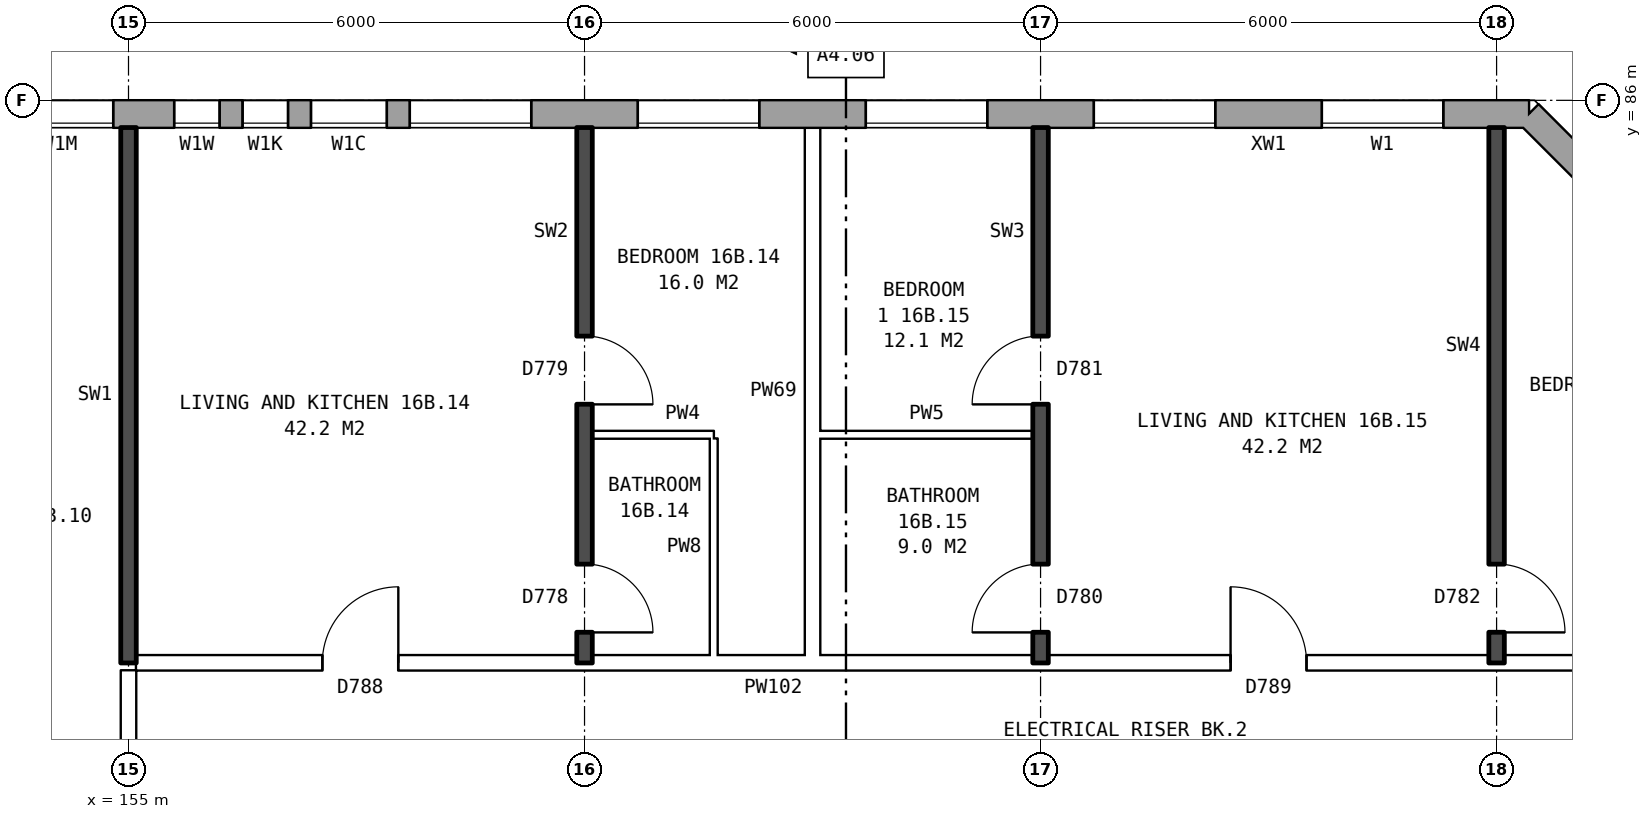
"""IFC4 building model, lengths in metres.
Left out: names, types, materials, properties, quantities, classifications, styles, units other than length and angle.
Written with IfcOpenShell. Run it as: python <this file> out.ifc"""

import sys

from ifc_helpers import new_model, si_unit, direction, frame, frame_2d, origin, place, context, subcontext, project, spatial, rectangle, extrude, element, fill, save


model = new_model("IFC4")
c1 = context("Model", 3, precision=1e-05, world=origin(), true_north=direction((0.0, 1.0)))
c2 = subcontext(c1, "Body", "Model", "MODEL_VIEW")
j1 = project(units=[si_unit("LENGTHUNIT", "METRE"), si_unit("PLANEANGLEUNIT", "RADIAN")], contexts=[c1])
p1 = place(None, origin())
s1 = spatial("IfcSite", under=j1, at=p1, CompositionType="ELEMENT")
p2 = place(p1, origin())
s2 = spatial("IfcBuilding", under=s1, at=p2, CompositionType="ELEMENT")
p3 = place(p2, frame((0.0, 0.0, 59.8)))
s3 = spatial("IfcBuildingStorey", under=s2, at=p3, CompositionType="ELEMENT", Elevation=59.8)
p4 = place(p3, frame((176.32, 82.925, 0.0), z_axis=(0.0, 0.0, 1.0), x_axis=(-0.707106781187, 0.707106781187, 0.0)))
e1 = element("IfcWall", 1, at=p4, inside=s3, PredefinedType="STANDARD", context=c2, shape_type="SweptSolid", body=[
    extrude(rectangle(XDim=4.094, YDim=0.36, at=frame_2d((2.047, 0.0))), origin(), (0.0, 0.0, 1.0), 2.85),
])
p5 = place(p4, frame((1.247, 0.0, 0.8)))
e2 = element("IfcOpeningElement", 2, at=p5, cuts=e1, PredefinedType="OPENING", context=c2, shape_type="SweptSolid", body=[
    extrude(rectangle(XDim=1.6, YDim=1.8, at=frame_2d((0.8, 0.9))), frame((0.0, 0.19, 0.0), z_axis=(0.0, -1.0, 0.0), x_axis=(1.0, 0.0, 0.0)), (0.0, 0.0, 1.0), 0.38),
])
p6 = place(p3, frame((173.425, 85.82, 0.0), z_axis=(0.0, 0.0, 1.0), x_axis=(-1.0, 0.0, 0.0)))
e3 = element("IfcWall", 3, at=p6, inside=s3, PredefinedType="STANDARD", context=c2, shape_type="SweptSolid", body=[
    extrude(rectangle(XDim=39.351, YDim=0.36, at=frame_2d((19.675, 0.0))), origin(), (0.0, 0.0, 1.0), 2.85),
])
p7 = place(p6, frame((1.125, 0.0, 0.8)))
e4 = element("IfcOpeningElement", 4, at=p7, cuts=e3, PredefinedType="OPENING", context=c2, shape_type="SweptSolid", body=[
    extrude(rectangle(XDim=1.6, YDim=1.8, at=frame_2d((0.8, 0.9))), frame((0.0, 0.19, 0.0), z_axis=(0.0, -1.0, 0.0), x_axis=(1.0, 0.0, 0.0)), (0.0, 0.0, 1.0), 0.38),
])
p8 = place(p6, frame((4.125, 0.0, 0.8)))
e5 = element("IfcOpeningElement", 5, at=p8, cuts=e3, PredefinedType="OPENING", context=c2, shape_type="SweptSolid", body=[
    extrude(rectangle(XDim=1.6, YDim=1.8, at=frame_2d((0.8, 0.9))), frame((0.0, 0.19, 0.0), z_axis=(0.0, -1.0, 0.0), x_axis=(1.0, 0.0, 0.0)), (0.0, 0.0, 1.0), 0.38),
])
p9 = place(p6, frame((7.125, 0.0, 0.8)))
e6 = element("IfcOpeningElement", 6, at=p9, cuts=e3, PredefinedType="OPENING", context=c2, shape_type="SweptSolid", body=[
    extrude(rectangle(XDim=1.6, YDim=1.8, at=frame_2d((0.8, 0.9))), frame((0.0, 0.19, 0.0), z_axis=(0.0, -1.0, 0.0), x_axis=(1.0, 0.0, 0.0)), (0.0, 0.0, 1.0), 0.38),
])
p10 = place(p6, frame((10.125, 0.0, 0.8)))
e7 = element("IfcOpeningElement", 7, at=p10, cuts=e3, PredefinedType="OPENING", context=c2, shape_type="SweptSolid", body=[
    extrude(rectangle(XDim=1.6, YDim=1.8, at=frame_2d((0.8, 0.9))), frame((0.0, 0.19, 0.0), z_axis=(0.0, -1.0, 0.0), x_axis=(1.0, 0.0, 0.0)), (0.0, 0.0, 1.0), 0.38),
])
p11 = place(p6, frame((13.125, 0.0, 0.8)))
e8 = element("IfcOpeningElement", 8, at=p11, cuts=e3, PredefinedType="OPENING", context=c2, shape_type="SweptSolid", body=[
    extrude(rectangle(XDim=1.6, YDim=1.8, at=frame_2d((0.8, 0.9))), frame((0.0, 0.19, 0.0), z_axis=(0.0, -1.0, 0.0), x_axis=(1.0, 0.0, 0.0)), (0.0, 0.0, 1.0), 0.38),
])
p12 = place(p6, frame((15.025, 0.0, 0.8)))
e9 = element("IfcOpeningElement", 9, at=p12, cuts=e3, PredefinedType="OPENING", context=c2, shape_type="SweptSolid", body=[
    extrude(rectangle(XDim=1.0, YDim=1.8, at=frame_2d((0.5, 0.9))), frame((0.0, 0.19, 0.0), z_axis=(0.0, -1.0, 0.0), x_axis=(1.0, 0.0, 0.0)), (0.0, 0.0, 1.0), 0.38),
])
p13 = place(p6, frame((18.625, 0.0, 0.15)))
e10 = element("IfcOpeningElement", 10, at=p13, cuts=e3, PredefinedType="OPENING", context=c2, shape_type="SweptSolid", body=[
    extrude(rectangle(XDim=1.4, YDim=1.2, at=frame_2d((0.7, 0.6))), frame((0.0, 0.19, 0.0), z_axis=(0.0, -1.0, 0.0), x_axis=(1.0, 0.0, 0.0)), (0.0, 0.0, 1.0), 0.38),
])
p14 = place(p6, frame((21.575, 0.0, 1.7)))
e11 = element("IfcOpeningElement", 11, at=p14, cuts=e3, PredefinedType="OPENING", context=c2, shape_type="SweptSolid", body=[
    extrude(rectangle(XDim=0.6, YDim=0.9, at=frame_2d((0.3, 0.45))), frame((0.0, 0.19, 0.0), z_axis=(0.0, -1.0, 0.0), x_axis=(1.0, 0.0, 0.0)), (0.0, 0.0, 1.0), 0.38),
])
p15 = place(p6, frame((25.125, 0.0, 0.8)))
e12 = element("IfcOpeningElement", 12, at=p15, cuts=e3, PredefinedType="OPENING", context=c2, shape_type="SweptSolid", body=[
    extrude(rectangle(XDim=1.6, YDim=1.8, at=frame_2d((0.8, 0.9))), frame((0.0, 0.19, 0.0), z_axis=(0.0, -1.0, 0.0), x_axis=(1.0, 0.0, 0.0)), (0.0, 0.0, 1.0), 0.38),
])
p16 = place(p6, frame((28.125, 0.0, 0.8)))
e13 = element("IfcOpeningElement", 13, at=p16, cuts=e3, PredefinedType="OPENING", context=c2, shape_type="SweptSolid", body=[
    extrude(rectangle(XDim=1.6, YDim=1.8, at=frame_2d((0.8, 0.9))), frame((0.0, 0.19, 0.0), z_axis=(0.0, -1.0, 0.0), x_axis=(1.0, 0.0, 0.0)), (0.0, 0.0, 1.0), 0.38),
])
p17 = place(p6, frame((31.125, 0.0, 0.8)))
e14 = element("IfcOpeningElement", 14, at=p17, cuts=e3, PredefinedType="OPENING", context=c2, shape_type="SweptSolid", body=[
    extrude(rectangle(XDim=1.6, YDim=1.8, at=frame_2d((0.8, 0.9))), frame((0.0, 0.19, 0.0), z_axis=(0.0, -1.0, 0.0), x_axis=(1.0, 0.0, 0.0)), (0.0, 0.0, 1.0), 0.38),
])
p18 = place(p6, frame((34.125, 0.0, 0.8)))
e15 = element("IfcOpeningElement", 15, at=p18, cuts=e3, PredefinedType="OPENING", context=c2, shape_type="SweptSolid", body=[
    extrude(rectangle(XDim=1.6, YDim=1.8, at=frame_2d((0.8, 0.9))), frame((0.0, 0.19, 0.0), z_axis=(0.0, -1.0, 0.0), x_axis=(1.0, 0.0, 0.0)), (0.0, 0.0, 1.0), 0.38),
])
p19 = place(p6, frame((37.125, 0.0, 0.8)))
e16 = element("IfcOpeningElement", 16, at=p19, cuts=e3, PredefinedType="OPENING", context=c2, shape_type="SweptSolid", body=[
    extrude(rectangle(XDim=1.6, YDim=1.8, at=frame_2d((0.8, 0.9))), frame((0.0, 0.19, 0.0), z_axis=(0.0, -1.0, 0.0), x_axis=(1.0, 0.0, 0.0)), (0.0, 0.0, 1.0), 0.38),
])
p20 = place(p6, frame((16.325, 0.0, 1.0)))
e17 = element("IfcOpeningElement", 17, at=p20, cuts=e3, PredefinedType="OPENING", context=c2, shape_type="SweptSolid", body=[
    extrude(rectangle(XDim=0.6, YDim=1.5, at=frame_2d((0.3, 0.75))), frame((0.0, 0.19, 0.0), z_axis=(0.0, -1.0, 0.0), x_axis=(1.0, 0.0, 0.0)), (0.0, 0.0, 1.0), 0.38),
])
p21 = place(p6, frame((17.225, 0.0, 1.7)))
e18 = element("IfcOpeningElement", 18, at=p21, cuts=e3, PredefinedType="OPENING", context=c2, shape_type="SweptSolid", body=[
    extrude(rectangle(XDim=0.6, YDim=0.9, at=frame_2d((0.3, 0.45))), frame((0.0, 0.19, 0.0), z_axis=(0.0, -1.0, 0.0), x_axis=(1.0, 0.0, 0.0)), (0.0, 0.0, 1.0), 0.38),
])
p22 = place(p6, frame((20.325, 0.0, 0.25)))
e19 = element("IfcOpeningElement", 19, at=p22, cuts=e3, PredefinedType="OPENING", context=c2, shape_type="SweptSolid", body=[
    extrude(rectangle(XDim=0.6, YDim=0.9, at=frame_2d((0.3, 0.45))), frame((0.0, 0.19, 0.0), z_axis=(0.0, -1.0, 0.0), x_axis=(1.0, 0.0, 0.0)), (0.0, 0.0, 1.0), 0.38),
])
p23 = place(p6, frame((22.625, 0.0, 0.8)))
e20 = element("IfcOpeningElement", 20, at=p23, cuts=e3, PredefinedType="OPENING", context=c2, shape_type="SweptSolid", body=[
    extrude(rectangle(XDim=1.6, YDim=1.8, at=frame_2d((0.8, 0.9))), frame((0.0, 0.19, 0.0), z_axis=(0.0, -1.0, 0.0), x_axis=(1.0, 0.0, 0.0)), (0.0, 0.0, 1.0), 0.38),
])
p24 = place(p3, frame((155.1, 78.6, 0.0), z_axis=(0.0, 0.0, 1.0), x_axis=(1.0, 0.0, 0.0)))
e21 = element("IfcWall", 21, at=p24, inside=s3, PredefinedType="PARTITIONING", context=c2, shape_type="SweptSolid", body=[
    extrude(rectangle(XDim=21.04, YDim=0.2, at=frame_2d((10.52, 0.0))), origin(), (0.0, 0.0, 1.0), 2.85),
])
p25 = place(p24, frame((2.45, 0.0, 0.0)))
e22 = element("IfcOpeningElement", 22, at=p25, cuts=e21, PredefinedType="OPENING", context=c2, shape_type="SweptSolid", body=[
    extrude(rectangle(XDim=1.0, YDim=2.1, at=frame_2d((0.5, 1.05))), frame((0.0, 0.11, 0.0), z_axis=(0.0, -1.0, 0.0), x_axis=(1.0, 0.0, 0.0)), (0.0, 0.0, 1.0), 0.22),
])
p26 = place(p24, frame((14.4, 0.0, 0.0)))
e23 = element("IfcOpeningElement", 23, at=p26, cuts=e21, PredefinedType="OPENING", context=c2, shape_type="SweptSolid", body=[
    extrude(rectangle(XDim=1.0, YDim=2.1, at=frame_2d((0.5, 1.05))), frame((0.0, 0.11, 0.0), z_axis=(0.0, -1.0, 0.0), x_axis=(1.0, 0.0, 0.0)), (0.0, 0.0, 1.0), 0.22),
])
p27 = place(p3, frame((161.1, 81.6, 0.0), z_axis=(0.0, 0.0, 1.0), x_axis=(1.0, 0.0, 0.0)))
e24 = element("IfcWall", 24, at=p27, inside=s3, PredefinedType="PARTITIONING", context=c2, shape_type="SweptSolid", body=[
    extrude(rectangle(XDim=1.6, YDim=0.1, at=frame_2d((0.8, 0.0))), origin(), (0.0, 0.0, 1.0), 2.85),
])
p28 = place(p3, frame((164.1, 81.6, 0.0), z_axis=(0.0, 0.0, 1.0), x_axis=(1.0, 0.0, 0.0)))
e25 = element("IfcWall", 25, at=p28, inside=s3, PredefinedType="PARTITIONING", context=c2, shape_type="SweptSolid", body=[
    extrude(rectangle(XDim=2.8, YDim=0.1, at=frame_2d((1.4, 0.0))), origin(), (0.0, 0.0, 1.0), 2.85),
])
p29 = place(p3, frame((155.0, 76.3, 0.0), z_axis=(0.0, 0.0, 1.0), x_axis=(0.0, 1.0, 0.0)))
e26 = element("IfcWall", 26, at=p29, inside=s3, PredefinedType="PARTITIONING", context=c2, shape_type="SweptSolid", body=[
    extrude(rectangle(XDim=2.2, YDim=0.2, at=frame_2d((1.1, 0.0))), origin(), (0.0, 0.0, 1.0), 2.85),
])
p30 = place(p3, frame((155.0, 78.6, 0.0), z_axis=(0.0, 0.0, 1.0), x_axis=(0.0, 1.0, 0.0)))
e27 = element("IfcWall", 27, at=p30, inside=s3, PredefinedType="SOLIDWALL", context=c2, shape_type="SweptSolid", body=[
    extrude(rectangle(XDim=7.04, YDim=0.2, at=frame_2d((3.52, 0.0))), origin(), (0.0, 0.0, 1.0), 2.85),
])
p31 = place(p3, frame((161.0, 78.6, 0.0), z_axis=(0.0, 0.0, 1.0), x_axis=(0.0, 1.0, 0.0)))
e28 = element("IfcWall", 28, at=p31, inside=s3, PredefinedType="SOLIDWALL", context=c2, shape_type="SweptSolid", body=[
    extrude(rectangle(XDim=7.04, YDim=0.2, at=frame_2d((3.52, 0.0))), origin(), (0.0, 0.0, 1.0), 2.85),
])
p32 = place(p31, frame((3.4, 0.0, 0.0)))
e29 = element("IfcOpeningElement", 29, at=p32, cuts=e28, PredefinedType="OPENING", context=c2, shape_type="SweptSolid", body=[
    extrude(rectangle(XDim=0.9, YDim=2.1, at=frame_2d((0.45, 1.05))), frame((0.0, 0.11, 0.0), z_axis=(0.0, -1.0, 0.0), x_axis=(1.0, 0.0, 0.0)), (0.0, 0.0, 1.0), 0.22),
])
p33 = place(p31, frame((0.4, 0.0, 0.0)))
e30 = element("IfcOpeningElement", 30, at=p33, cuts=e28, PredefinedType="OPENING", context=c2, shape_type="SweptSolid", body=[
    extrude(rectangle(XDim=0.9, YDim=2.1, at=frame_2d((0.45, 1.05))), frame((0.0, 0.11, 0.0), z_axis=(0.0, -1.0, 0.0), x_axis=(1.0, 0.0, 0.0)), (0.0, 0.0, 1.0), 0.22),
])
p34 = place(p3, frame((162.7, 78.7, 0.0), z_axis=(0.0, 0.0, 1.0), x_axis=(0.0, 1.0, 0.0)))
e31 = element("IfcWall", 31, at=p34, inside=s3, PredefinedType="PARTITIONING", context=c2, shape_type="SweptSolid", body=[
    extrude(rectangle(XDim=2.85, YDim=0.1, at=frame_2d((1.425, 0.0))), origin(), (0.0, 0.0, 1.0), 2.85),
])
p35 = place(p3, frame((164.0, 78.7, 0.0), z_axis=(0.0, 0.0, 1.0), x_axis=(0.0, 1.0, 0.0)))
e32 = element("IfcWall", 32, at=p35, inside=s3, PredefinedType="PARTITIONING", context=c2, shape_type="SweptSolid", body=[
    extrude(rectangle(XDim=6.94, YDim=0.2, at=frame_2d((3.47, 0.0))), origin(), (0.0, 0.0, 1.0), 2.85),
])
p36 = place(p3, frame((167.0, 78.6, 0.0), z_axis=(0.0, 0.0, 1.0), x_axis=(0.0, 1.0, 0.0)))
e33 = element("IfcWall", 33, at=p36, inside=s3, PredefinedType="SOLIDWALL", context=c2, shape_type="SweptSolid", body=[
    extrude(rectangle(XDim=7.04, YDim=0.2, at=frame_2d((3.52, 0.0))), origin(), (0.0, 0.0, 1.0), 2.85),
])
p37 = place(p36, frame((3.4, 0.0, 0.0)))
e34 = element("IfcOpeningElement", 34, at=p37, cuts=e33, PredefinedType="OPENING", context=c2, shape_type="SweptSolid", body=[
    extrude(rectangle(XDim=0.9, YDim=2.1, at=frame_2d((0.45, 1.05))), frame((0.0, 0.11, 0.0), z_axis=(0.0, -1.0, 0.0), x_axis=(1.0, 0.0, 0.0)), (0.0, 0.0, 1.0), 0.22),
])
p38 = place(p36, frame((0.4, 0.0, 0.0)))
e35 = element("IfcOpeningElement", 35, at=p38, cuts=e33, PredefinedType="OPENING", context=c2, shape_type="SweptSolid", body=[
    extrude(rectangle(XDim=0.9, YDim=2.1, at=frame_2d((0.45, 1.05))), frame((0.0, 0.11, 0.0), z_axis=(0.0, -1.0, 0.0), x_axis=(1.0, 0.0, 0.0)), (0.0, 0.0, 1.0), 0.22),
])
p39 = place(p3, frame((173.0, 78.6, 0.0), z_axis=(0.0, 0.0, 1.0), x_axis=(0.0, 1.0, 0.0)))
e36 = element("IfcWall", 36, at=p39, inside=s3, PredefinedType="SOLIDWALL", context=c2, shape_type="SweptSolid", body=[
    extrude(rectangle(XDim=7.04, YDim=0.2, at=frame_2d((3.52, 0.0))), origin(), (0.0, 0.0, 1.0), 2.85),
])
p40 = place(p39, frame((0.4, 0.0, 0.0)))
e37 = element("IfcOpeningElement", 37, at=p40, cuts=e36, PredefinedType="OPENING", context=c2, shape_type="SweptSolid", body=[
    extrude(rectangle(XDim=0.9, YDim=2.1, at=frame_2d((0.45, 1.05))), frame((0.0, 0.11, 0.0), z_axis=(0.0, -1.0, 0.0), x_axis=(1.0, 0.0, 0.0)), (0.0, 0.0, 1.0), 0.22),
])
p41 = place(p7, origin())
e38 = element("IfcWindow", 38, at=p41, inside=s3, PartitioningType="SINGLE_PANEL", PredefinedType="WINDOW", context=c2, shape_type="SweptSolid", body=[
    extrude(rectangle(XDim=1.6, YDim=1.8, at=frame_2d((0.8, 0.9))), frame((0.0, 0.15, 0.0), z_axis=(0.0, -1.0, 0.0), x_axis=(1.0, 0.0, 0.0)), (0.0, 0.0, 1.0), 0.06),
])
fill(e4, e38)
p42 = place(p8, origin())
e39 = element("IfcWindow", 39, at=p42, inside=s3, PartitioningType="SINGLE_PANEL", PredefinedType="WINDOW", context=c2, shape_type="SweptSolid", body=[
    extrude(rectangle(XDim=1.6, YDim=1.8, at=frame_2d((0.8, 0.9))), frame((0.0, 0.15, 0.0), z_axis=(0.0, -1.0, 0.0), x_axis=(1.0, 0.0, 0.0)), (0.0, 0.0, 1.0), 0.06),
])
fill(e5, e39)
p43 = place(p9, origin())
e40 = element("IfcWindow", 40, at=p43, inside=s3, PartitioningType="SINGLE_PANEL", PredefinedType="WINDOW", context=c2, shape_type="SweptSolid", body=[
    extrude(rectangle(XDim=1.6, YDim=1.8, at=frame_2d((0.8, 0.9))), frame((0.0, 0.15, 0.0), z_axis=(0.0, -1.0, 0.0), x_axis=(1.0, 0.0, 0.0)), (0.0, 0.0, 1.0), 0.06),
])
fill(e6, e40)
p44 = place(p10, origin())
e41 = element("IfcWindow", 41, at=p44, inside=s3, PartitioningType="SINGLE_PANEL", PredefinedType="WINDOW", context=c2, shape_type="SweptSolid", body=[
    extrude(rectangle(XDim=1.6, YDim=1.8, at=frame_2d((0.8, 0.9))), frame((0.0, 0.15, 0.0), z_axis=(0.0, -1.0, 0.0), x_axis=(1.0, 0.0, 0.0)), (0.0, 0.0, 1.0), 0.06),
])
fill(e7, e41)
p45 = place(p11, origin())
e42 = element("IfcWindow", 42, at=p45, inside=s3, PartitioningType="SINGLE_PANEL", PredefinedType="WINDOW", context=c2, shape_type="SweptSolid", body=[
    extrude(rectangle(XDim=1.6, YDim=1.8, at=frame_2d((0.8, 0.9))), frame((0.0, 0.15, 0.0), z_axis=(0.0, -1.0, 0.0), x_axis=(1.0, 0.0, 0.0)), (0.0, 0.0, 1.0), 0.06),
])
fill(e8, e42)
p46 = place(p12, origin())
e43 = element("IfcWindow", 43, at=p46, inside=s3, PartitioningType="SINGLE_PANEL", PredefinedType="WINDOW", context=c2, shape_type="SweptSolid", body=[
    extrude(rectangle(XDim=1.0, YDim=1.8, at=frame_2d((0.5, 0.9))), frame((0.0, 0.15, 0.0), z_axis=(0.0, -1.0, 0.0), x_axis=(1.0, 0.0, 0.0)), (0.0, 0.0, 1.0), 0.06),
])
fill(e9, e43)
p47 = place(p13, origin())
e44 = element("IfcWindow", 44, at=p47, inside=s3, PartitioningType="SINGLE_PANEL", PredefinedType="WINDOW", context=c2, shape_type="SweptSolid", body=[
    extrude(rectangle(XDim=1.4, YDim=1.2, at=frame_2d((0.7, 0.6))), frame((0.0, 0.15, 0.0), z_axis=(0.0, -1.0, 0.0), x_axis=(1.0, 0.0, 0.0)), (0.0, 0.0, 1.0), 0.06),
])
fill(e10, e44)
p48 = place(p32, frame((0.9, 0.0, 0.0), z_axis=(0.0, 0.0, 1.0), x_axis=(-1.0, 0.0, 0.0)))
e45 = element("IfcDoor", 45, at=p48, inside=s3, OperationType="SINGLE_SWING_RIGHT", PredefinedType="DOOR", context=c2, shape_type="SweptSolid", body=[
    extrude(rectangle(XDim=0.9, YDim=2.1, at=frame_2d((0.45, 1.05))), frame((0.0, 0.025, 0.0), z_axis=(0.0, -1.0, 0.0), x_axis=(1.0, 0.0, 0.0)), (0.0, 0.0, 1.0), 0.05),
])
fill(e29, e45)
p49 = place(p25, origin())
e46 = element("IfcDoor", 46, at=p49, inside=s3, OperationType="SINGLE_SWING_RIGHT", PredefinedType="DOOR", context=c2, shape_type="SweptSolid", body=[
    extrude(rectangle(XDim=1.0, YDim=2.1, at=frame_2d((0.5, 1.05))), frame((0.0, 0.025, 0.0), z_axis=(0.0, -1.0, 0.0), x_axis=(1.0, 0.0, 0.0)), (0.0, 0.0, 1.0), 0.05),
])
fill(e22, e46)
p50 = place(p33, frame((0.9, 0.0, 0.0), z_axis=(0.0, 0.0, 1.0), x_axis=(-1.0, 0.0, 0.0)))
e47 = element("IfcDoor", 47, at=p50, inside=s3, OperationType="SINGLE_SWING_RIGHT", PredefinedType="DOOR", context=c2, shape_type="SweptSolid", body=[
    extrude(rectangle(XDim=0.9, YDim=2.1, at=frame_2d((0.45, 1.05))), frame((0.0, 0.025, 0.0), z_axis=(0.0, -1.0, 0.0), x_axis=(1.0, 0.0, 0.0)), (0.0, 0.0, 1.0), 0.05),
])
fill(e30, e47)
p51 = place(p37, origin())
e48 = element("IfcDoor", 48, at=p51, inside=s3, OperationType="SINGLE_SWING_LEFT", PredefinedType="DOOR", context=c2, shape_type="SweptSolid", body=[
    extrude(rectangle(XDim=0.9, YDim=2.1, at=frame_2d((0.45, 1.05))), frame((0.0, 0.025, 0.0), z_axis=(0.0, -1.0, 0.0), x_axis=(1.0, 0.0, 0.0)), (0.0, 0.0, 1.0), 0.05),
])
fill(e34, e48)
p52 = place(p40, frame((0.9, 0.0, 0.0), z_axis=(0.0, 0.0, 1.0), x_axis=(-1.0, 0.0, 0.0)))
e49 = element("IfcDoor", 49, at=p52, inside=s3, OperationType="SINGLE_SWING_RIGHT", PredefinedType="DOOR", context=c2, shape_type="SweptSolid", body=[
    extrude(rectangle(XDim=0.9, YDim=2.1, at=frame_2d((0.45, 1.05))), frame((0.0, 0.025, 0.0), z_axis=(0.0, -1.0, 0.0), x_axis=(1.0, 0.0, 0.0)), (0.0, 0.0, 1.0), 0.05),
])
fill(e37, e49)
p53 = place(p26, origin())
e50 = element("IfcDoor", 50, at=p53, inside=s3, OperationType="SINGLE_SWING_LEFT", PredefinedType="DOOR", context=c2, shape_type="SweptSolid", body=[
    extrude(rectangle(XDim=1.0, YDim=2.1, at=frame_2d((0.5, 1.05))), frame((0.0, 0.025, 0.0), z_axis=(0.0, -1.0, 0.0), x_axis=(1.0, 0.0, 0.0)), (0.0, 0.0, 1.0), 0.05),
])
fill(e23, e50)
p54 = place(p38, origin())
e51 = element("IfcDoor", 51, at=p54, inside=s3, OperationType="SINGLE_SWING_LEFT", PredefinedType="DOOR", context=c2, shape_type="SweptSolid", body=[
    extrude(rectangle(XDim=0.9, YDim=2.1, at=frame_2d((0.45, 1.05))), frame((0.0, 0.025, 0.0), z_axis=(0.0, -1.0, 0.0), x_axis=(1.0, 0.0, 0.0)), (0.0, 0.0, 1.0), 0.05),
])
fill(e35, e51)
p55 = place(p20, origin())
e52 = element("IfcWindow", 52, at=p55, inside=s3, PartitioningType="SINGLE_PANEL", PredefinedType="WINDOW", context=c2, shape_type="SweptSolid", body=[
    extrude(rectangle(XDim=0.6, YDim=1.5, at=frame_2d((0.3, 0.75))), frame((0.0, 0.15, 0.0), z_axis=(0.0, -1.0, 0.0), x_axis=(1.0, 0.0, 0.0)), (0.0, 0.0, 1.0), 0.06),
])
fill(e17, e52)
p56 = place(p21, origin())
e53 = element("IfcWindow", 53, at=p56, inside=s3, PartitioningType="SINGLE_PANEL", PredefinedType="WINDOW", context=c2, shape_type="SweptSolid", body=[
    extrude(rectangle(XDim=0.6, YDim=0.9, at=frame_2d((0.3, 0.45))), frame((0.0, 0.15, 0.0), z_axis=(0.0, -1.0, 0.0), x_axis=(1.0, 0.0, 0.0)), (0.0, 0.0, 1.0), 0.06),
])
fill(e18, e53)
save(model, sys.argv[1])
